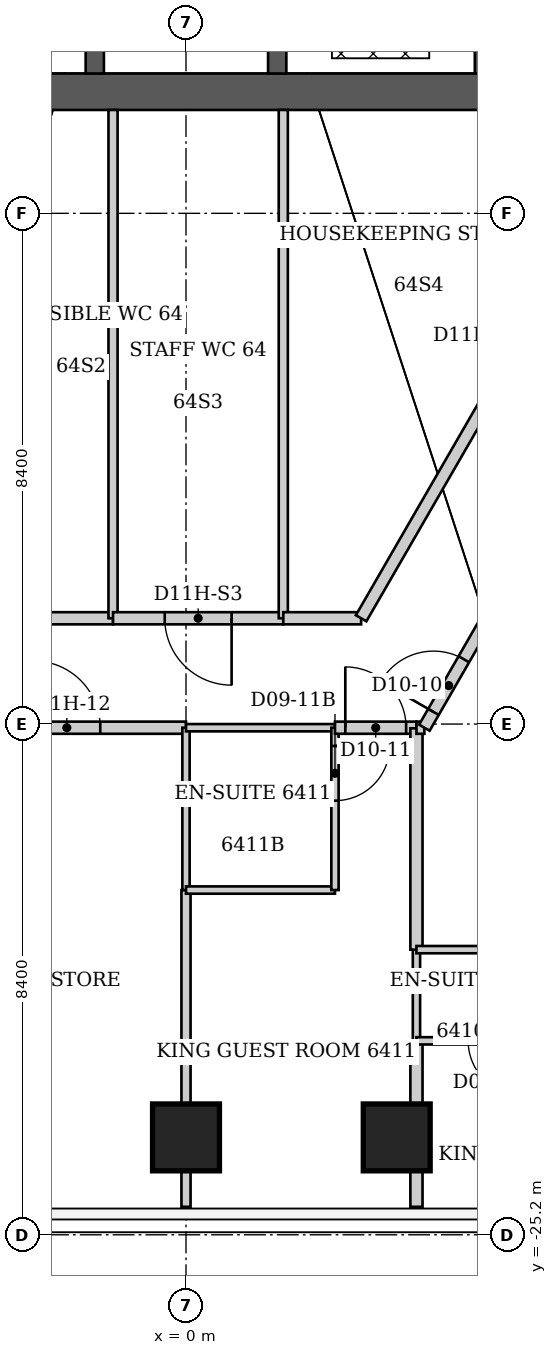
"""IFC4 building model, lengths in metres.
Left out: names, types, materials, properties, quantities, classifications, styles, units other than length and angle.
Written with IfcOpenShell. Run it as: python <this file> out.ifc"""

import sys

from ifc_helpers import new_model, si_unit, direction, frame, frame_2d, origin, origin_2d, place, context, subcontext, project, spatial, rectangle, extrude, clip, halfspace, element, fill, save


model = new_model("IFC4")
c1 = context("Model", 3, precision=1e-05, world=origin(), true_north=direction((0.0, 1.0)))
c2 = subcontext(c1, "Body", "Model", "MODEL_VIEW")
j1 = project(units=[si_unit("LENGTHUNIT", "METRE"), si_unit("PLANEANGLEUNIT", "RADIAN")], contexts=[c1])
p1 = place(None, origin())
s1 = spatial("IfcSite", under=j1, at=p1, CompositionType="ELEMENT")
p2 = place(p1, origin())
s2 = spatial("IfcBuilding", under=s1, at=p2, CompositionType="ELEMENT")
p3 = place(p2, frame((0.0, 0.0, 257.0)))
s3 = spatial("IfcBuildingStorey", under=s2, at=p3, CompositionType="ELEMENT", Elevation=257.0)
p4 = place(p3, frame((3.466, -23.598, -0.059), z_axis=(0.0, 0.0, 1.0), x_axis=(0.0, -1.0, 0.0)))
e1 = element("IfcColumn", 1, at=p4, inside=s3, PredefinedType="COLUMN", context=c2, shape_type="SweptSolid", body=[
    clip(extrude(rectangle(XDim=1.1, YDim=1.1, at=origin_2d()), origin(), (0.0, 0.0, 1.0), 3.859), halfspace(frame((0.0, 0.0, 0.059)), True)),
])
p5 = place(p3, frame((0.0, -23.598, -0.051), z_axis=(0.0, 0.0, 1.0), x_axis=(0.0, -1.0, 0.0)))
e2 = element("IfcColumn", 2, at=p5, inside=s3, PredefinedType="COLUMN", context=c2, shape_type="SweptSolid", body=[
    clip(extrude(rectangle(XDim=1.1, YDim=1.1, at=origin_2d()), origin(), (0.0, 0.0, 1.0), 3.851), halfspace(frame((0.0, 0.0, 0.051)), True)),
])
p6 = place(p3, frame((-8.35, -6.4, 0.0), z_axis=(0.0, 0.0, 1.0), x_axis=(1.0, 0.0, 0.0)))
e3 = element("IfcWall", 3, at=p6, inside=s3, PredefinedType="SHEAR", context=c2, shape_type="SweptSolid", body=[
    extrude(rectangle(XDim=16.7, YDim=0.6, at=frame_2d((8.35, 0.0))), origin(), (0.0, 0.0, 1.0), 3.8),
])
for number, where, z_axis, x_axis in (
    (4, (-1.5, -6.1, 0.0), (0.0, 0.0, 1.0), (0.0, 1.0, 0.0)),
    (5, (1.5, -6.1, 0.0), (0.0, 0.0, 1.0), (0.0, 1.0, 0.0)),
    (6, (4.9, -6.1, 0.0), (0.0, 0.0, 1.0), (0.0, 1.0, 0.0)),
):
    element("IfcWall", number, at=place(p3, frame(where, z_axis=z_axis, x_axis=x_axis)), inside=s3, PredefinedType="SHEAR", context=c2, shape_type="SweptSolid", body=[
        extrude(rectangle(XDim=7.2, YDim=0.3, at=frame_2d((3.6, 0.0))), origin(), (0.0, 0.0, 1.0), 3.8),
    ])
p7 = place(p3, frame((-3.92, -16.86, 0.0), z_axis=(0.0, 0.0, 1.0), x_axis=(1.0, 0.0, 0.0)))
e7 = element("IfcWall", 7, at=p7, inside=s3, PredefinedType="PARTITIONING", context=c2, shape_type="SweptSolid", body=[
    extrude(rectangle(XDim=3.92, YDim=0.2, at=frame_2d((1.96, 0.0))), origin(), (0.0, 0.0, 1.0), 3.64),
])
p8 = place(p7, frame((1.41, 0.0, 0.0)))
e8 = element("IfcOpeningElement", 8, at=p8, cuts=e7, PredefinedType="OPENING", context=c2, shape_type="SweptSolid", body=[
    extrude(rectangle(XDim=1.1, YDim=2.2, at=frame_2d((0.55, 1.1))), frame((0.0, 0.1, 0.0), z_axis=(0.0, -1.0, 0.0), x_axis=(1.0, 0.0, 0.0)), (0.0, 0.0, 1.0), 0.2),
])
p9 = place(p3, frame((-1.2, -15.06, 0.0), z_axis=(0.0, 0.0, 1.0), x_axis=(-1.0, 0.0, 0.0)))
e9 = element("IfcWall", 9, at=p9, inside=s3, PredefinedType="PARTITIONING", context=c2, shape_type="SweptSolid", body=[
    extrude(rectangle(XDim=1.68, YDim=0.2, at=frame_2d((0.84, 0.0))), origin(), (0.0, 0.0, 1.0), 3.64),
])
p10 = place(p3, frame((-1.2, -6.7, 0.0), z_axis=(0.0, 0.0, 1.0), x_axis=(0.0, -1.0, 0.0)))
e10 = element("IfcWall", 10, at=p10, inside=s3, PredefinedType="PARTITIONING", context=c2, shape_type="SweptSolid", body=[
    extrude(rectangle(XDim=8.36, YDim=0.15, at=frame_2d((4.18, 0.0))), origin(), (0.0, 0.0, 1.0), 3.64),
])
p11 = place(p3, frame((0.0, -24.74, 0.0), z_axis=(0.0, 0.0, 1.0), x_axis=(0.0, 1.0, 0.0)))
e11 = element("IfcWall", 11, at=p11, inside=s3, PredefinedType="PARTITIONING", context=c2, shape_type="SweptSolid", body=[
    extrude(rectangle(XDim=5.21, YDim=0.15, at=frame_2d((2.605, 0.0))), origin(), (0.0, 0.0, 1.0), 2.86),
])
p12 = place(p3, frame((0.0, -19.53, 0.0), z_axis=(0.0, 0.0, 1.0), x_axis=(0.0, 1.0, 0.0)))
e12 = element("IfcWall", 12, at=p12, inside=s3, PredefinedType="PARTITIONING", context=c2, shape_type="SweptSolid", body=[
    extrude(rectangle(XDim=2.67, YDim=0.12, at=frame_2d((1.335, 0.0))), origin(), (0.0, 0.0, 1.0), 2.86),
])
for number, where, z_axis, x_axis in (
    (13, (0.0, -19.53, 0.0), (0.0, 0.0, 1.0), (1.0, 0.0, 0.0)),
    (14, (0.0, -16.86, 0.0), (0.0, 0.0, 1.0), (1.0, 0.0, 0.0)),
):
    element("IfcWall", number, at=place(p3, frame(where, z_axis=z_axis, x_axis=x_axis)), inside=s3, PredefinedType="PARTITIONING", context=c2, shape_type="SweptSolid", body=[
        extrude(rectangle(XDim=2.45, YDim=0.12, at=frame_2d((1.225, 0.0))), origin(), (0.0, 0.0, 1.0), 3.64),
    ])
p13 = place(p3, frame((1.6, -15.06, 0.0), z_axis=(0.0, 0.0, 1.0), x_axis=(-1.0, 0.0, 0.0)))
e15 = element("IfcWall", 15, at=p13, inside=s3, PredefinedType="PARTITIONING", context=c2, shape_type="SweptSolid", body=[
    extrude(rectangle(XDim=2.8, YDim=0.2, at=frame_2d((1.4, 0.0))), origin(), (0.0, 0.0, 1.0), 3.64),
])
p14 = place(p13, frame((0.85, 0.0, 0.0)))
e16 = element("IfcOpeningElement", 16, at=p14, cuts=e15, PredefinedType="OPENING", context=c2, shape_type="SweptSolid", body=[
    extrude(rectangle(XDim=1.1, YDim=2.2, at=frame_2d((0.55, 1.1))), frame((0.0, 0.1, 0.0), z_axis=(0.0, -1.0, 0.0), x_axis=(1.0, 0.0, 0.0)), (0.0, 0.0, 1.0), 0.2),
])
p15 = place(p3, frame((1.6, -6.7, 0.0), z_axis=(0.0, 0.0, 1.0), x_axis=(0.0, -1.0, 0.0)))
e17 = element("IfcWall", 17, at=p15, inside=s3, PredefinedType="PARTITIONING", context=c2, shape_type="SweptSolid", body=[
    extrude(rectangle(XDim=8.36, YDim=0.15, at=frame_2d((4.18, 0.0))), origin(), (0.0, 0.0, 1.0), 2.86),
])
p16 = place(p3, frame((2.45, -19.53, 0.0), z_axis=(0.0, 0.0, 1.0), x_axis=(0.0, 1.0, 0.0)))
e18 = element("IfcWall", 18, at=p16, inside=s3, PredefinedType="PARTITIONING", context=c2, shape_type="SweptSolid", body=[
    extrude(rectangle(XDim=2.67, YDim=0.12, at=frame_2d((1.335, 0.0))), origin(), (0.0, 0.0, 1.0), 3.64),
])
p17 = place(p16, frame((1.47, 0.0, 0.0)))
e19 = element("IfcOpeningElement", 19, at=p17, cuts=e18, PredefinedType="OPENING", context=c2, shape_type="SweptSolid", body=[
    extrude(rectangle(XDim=0.9, YDim=2.03, at=frame_2d((0.45, 1.015))), frame((0.0, 0.06, 0.0), z_axis=(0.0, -1.0, 0.0), x_axis=(1.0, 0.0, 0.0)), (0.0, 0.0, 1.0), 0.12),
])
p18 = place(p3, frame((2.45, -16.86, 0.0), z_axis=(0.0, 0.0, 1.0), x_axis=(1.0, 0.0, 0.0)))
e20 = element("IfcWall", 20, at=p18, inside=s3, PredefinedType="PARTITIONING", context=c2, shape_type="SweptSolid", body=[
    extrude(rectangle(XDim=1.34, YDim=0.2, at=frame_2d((0.67, 0.0))), origin(), (0.0, 0.0, 1.0), 3.64),
])
p19 = place(p18, frame((0.17, 0.0, 0.0)))
e21 = element("IfcOpeningElement", 21, at=p19, cuts=e20, PredefinedType="OPENING", context=c2, shape_type="SweptSolid", body=[
    extrude(rectangle(XDim=1.0, YDim=2.13, at=frame_2d((0.5, 1.065))), frame((0.0, 0.1, 0.0), z_axis=(0.0, -1.0, 0.0), x_axis=(1.0, 0.0, 0.0)), (0.0, 0.0, 1.0), 0.2),
])
p20 = place(p3, frame((2.88, -15.06, 0.0), z_axis=(0.0, 0.0, 1.0), x_axis=(-1.0, 0.0, 0.0)))
e22 = element("IfcWall", 22, at=p20, inside=s3, PredefinedType="PARTITIONING", context=c2, shape_type="SweptSolid", body=[
    extrude(rectangle(XDim=1.28, YDim=0.2, at=frame_2d((0.64, 0.0))), origin(), (0.0, 0.0, 1.0), 3.64),
])
p21 = place(p3, frame((3.79, -24.74, 0.0), z_axis=(0.0, 0.0, 1.0), x_axis=(0.0, 1.0, 0.0)))
e23 = element("IfcWall", 23, at=p21, inside=s3, PredefinedType="PARTITIONING", context=c2, shape_type="SweptSolid", body=[
    extrude(rectangle(XDim=2.73, YDim=0.2, at=frame_2d((1.365, 0.0))), origin(), (0.0, 0.0, 1.0), 3.64),
])
p22 = place(p3, frame((3.79, -22.01, 0.0), z_axis=(0.0, 0.0, 1.0), x_axis=(0.0, 1.0, 0.0)))
e24 = element("IfcWall", 24, at=p22, inside=s3, PredefinedType="PARTITIONING", context=c2, shape_type="SweptSolid", body=[
    extrude(rectangle(XDim=1.5, YDim=0.12, at=frame_2d((0.75, 0.0))), origin(), (0.0, 0.0, 1.0), 3.64),
])
p23 = place(p3, frame((3.79, -22.01, 0.0), z_axis=(0.0, 0.0, 1.0), x_axis=(1.0, 0.0, 0.0)))
e25 = element("IfcWall", 25, at=p23, inside=s3, PredefinedType="PARTITIONING", context=c2, shape_type="SweptSolid", body=[
    extrude(rectangle(XDim=2.2, YDim=0.12, at=frame_2d((1.1, 0.0))), origin(), (0.0, 0.0, 1.0), 3.64),
])
p24 = place(p23, frame((0.85, 0.0, 0.0)))
e26 = element("IfcOpeningElement", 26, at=p24, cuts=e25, PredefinedType="OPENING", context=c2, shape_type="SweptSolid", body=[
    extrude(rectangle(XDim=0.9, YDim=2.03, at=frame_2d((0.45, 1.015))), frame((0.0, 0.06, 0.0), z_axis=(0.0, -1.0, 0.0), x_axis=(1.0, 0.0, 0.0)), (0.0, 0.0, 1.0), 0.12),
])
p25 = place(p3, frame((3.79, -20.51, 0.0), z_axis=(0.0, 0.0, 1.0), x_axis=(0.0, 1.0, 0.0)))
e27 = element("IfcWall", 27, at=p25, inside=s3, PredefinedType="PARTITIONING", context=c2, shape_type="SweptSolid", body=[
    extrude(rectangle(XDim=3.64, YDim=0.2, at=frame_2d((1.82, 0.0))), origin(), (0.0, 0.0, 1.0), 3.64),
])
p26 = place(p3, frame((3.79, -16.86, 0.0), z_axis=(0.0, 0.0, 1.0), x_axis=(1.0, 0.0, 0.0)))
e28 = element("IfcWall", 28, at=p26, inside=s3, PredefinedType="PARTITIONING", context=c2, shape_type="SweptSolid", body=[
    extrude(rectangle(XDim=0.13, YDim=0.2, at=frame_2d((0.065, 0.0))), origin(), (0.0, 0.0, 1.0), 3.64),
])
p27 = place(p3, frame((3.92, -16.86, 0.0), z_axis=(0.0, 0.0, 1.0), x_axis=(0.499693115345, 0.866202511239, 0.0)))
e29 = element("IfcWall", 29, at=p27, inside=s3, PredefinedType="PARTITIONING", context=c2, shape_type="SweptSolid", body=[
    extrude(rectangle(XDim=2.401, YDim=0.2, at=frame_2d((1.201, 0.0))), origin(), (0.0, 0.0, 1.0), 3.64),
])
p28 = place(p27, frame((0.3, 0.0, 0.0)))
e30 = element("IfcOpeningElement", 30, at=p28, cuts=e29, PredefinedType="OPENING", context=c2, shape_type="SweptSolid", body=[
    extrude(rectangle(XDim=1.0, YDim=2.13, at=frame_2d((0.5, 1.065))), frame((0.0, 0.1, 0.0), z_axis=(0.0, -1.0, 0.0), x_axis=(1.0, 0.0, 0.0)), (0.0, 0.0, 1.0), 0.2),
])
p29 = place(p3, frame((5.99, -20.51, 0.0), z_axis=(0.0, 0.0, 1.0), x_axis=(-1.0, 0.0, 0.0)))
e31 = element("IfcWall", 31, at=p29, inside=s3, PredefinedType="PARTITIONING", context=c2, shape_type="SweptSolid", body=[
    extrude(rectangle(XDim=2.2, YDim=0.12, at=frame_2d((1.1, 0.0))), origin(), (0.0, 0.0, 1.0), 3.64),
])
p30 = place(p3, frame((7.68, -6.75, 0.0), z_axis=(0.0, 0.0, 1.0), x_axis=(-0.500174600737, -0.865924574532, 0.0)))
e32 = element("IfcWall", 32, at=p30, inside=s3, PredefinedType="PARTITIONING", context=c2, shape_type="SweptSolid", body=[
    extrude(rectangle(XDim=9.597, YDim=0.2, at=frame_2d((4.798, 0.0))), origin(), (0.0, 0.0, 1.0), 3.64),
])
p31 = place(p30, frame((4.248, 0.0, 0.0)))
e33 = element("IfcOpeningElement", 33, at=p31, cuts=e32, PredefinedType="OPENING", context=c2, shape_type="SweptSolid", body=[
    extrude(rectangle(XDim=1.1, YDim=2.2, at=frame_2d((0.55, 1.1))), frame((0.0, 0.1, 0.0), z_axis=(0.0, -1.0, 0.0), x_axis=(1.0, 0.0, 0.0)), (0.0, 0.0, 1.0), 0.2),
])
p32 = place(p28, origin())
e34 = element("IfcDoor", 34, at=p32, inside=s3, OperationType="SINGLE_SWING_LEFT", PredefinedType="DOOR", context=c2, shape_type="SweptSolid", body=[
    extrude(rectangle(XDim=1.0, YDim=2.13, at=frame_2d((0.5, 1.065))), frame((0.0, 0.025, 0.0), z_axis=(0.0, -1.0, 0.0), x_axis=(1.0, 0.0, 0.0)), (0.0, 0.0, 1.0), 0.05),
])
fill(e30, e34)
p33 = place(p24, origin())
e35 = element("IfcDoor", 35, at=p33, inside=s3, OperationType="SINGLE_SWING_RIGHT", PredefinedType="DOOR", context=c2, shape_type="SweptSolid", body=[
    extrude(rectangle(XDim=0.9, YDim=2.03, at=frame_2d((0.45, 1.015))), frame((0.0, 0.025, 0.0), z_axis=(0.0, -1.0, 0.0), x_axis=(1.0, 0.0, 0.0)), (0.0, 0.0, 1.0), 0.05),
])
fill(e26, e35)
p34 = place(p19, origin())
e36 = element("IfcDoor", 36, at=p34, inside=s3, OperationType="SINGLE_SWING_LEFT", PredefinedType="DOOR", context=c2, shape_type="SweptSolid", body=[
    extrude(rectangle(XDim=1.0, YDim=2.13, at=frame_2d((0.5, 1.065))), frame((0.0, 0.025, 0.0), z_axis=(0.0, -1.0, 0.0), x_axis=(1.0, 0.0, 0.0)), (0.0, 0.0, 1.0), 0.05),
])
fill(e21, e36)
p35 = place(p17, origin())
e37 = element("IfcDoor", 37, at=p35, inside=s3, OperationType="SINGLE_SWING_RIGHT", PredefinedType="DOOR", context=c2, shape_type="SweptSolid", body=[
    extrude(rectangle(XDim=0.9, YDim=2.03, at=frame_2d((0.45, 1.015))), frame((0.0, 0.025, 0.0), z_axis=(0.0, -1.0, 0.0), x_axis=(1.0, 0.0, 0.0)), (0.0, 0.0, 1.0), 0.05),
])
fill(e19, e37)
p36 = place(p8, origin())
e38 = element("IfcDoor", 38, at=p36, inside=s3, OperationType="SINGLE_SWING_LEFT", PredefinedType="DOOR", context=c2, shape_type="SweptSolid", body=[
    extrude(rectangle(XDim=1.1, YDim=2.2, at=frame_2d((0.55, 1.1))), frame((0.0, 0.025, 0.0), z_axis=(0.0, -1.0, 0.0), x_axis=(1.0, 0.0, 0.0)), (0.0, 0.0, 1.0), 0.05),
])
fill(e8, e38)
p37 = place(p14, origin())
e39 = element("IfcDoor", 39, at=p37, inside=s3, OperationType="SINGLE_SWING_LEFT", PredefinedType="DOOR", context=c2, shape_type="SweptSolid", body=[
    extrude(rectangle(XDim=1.1, YDim=2.2, at=frame_2d((0.55, 1.1))), frame((0.0, 0.025, 0.0), z_axis=(0.0, -1.0, 0.0), x_axis=(1.0, 0.0, 0.0)), (0.0, 0.0, 1.0), 0.05),
])
fill(e16, e39)
save(model, sys.argv[1])
